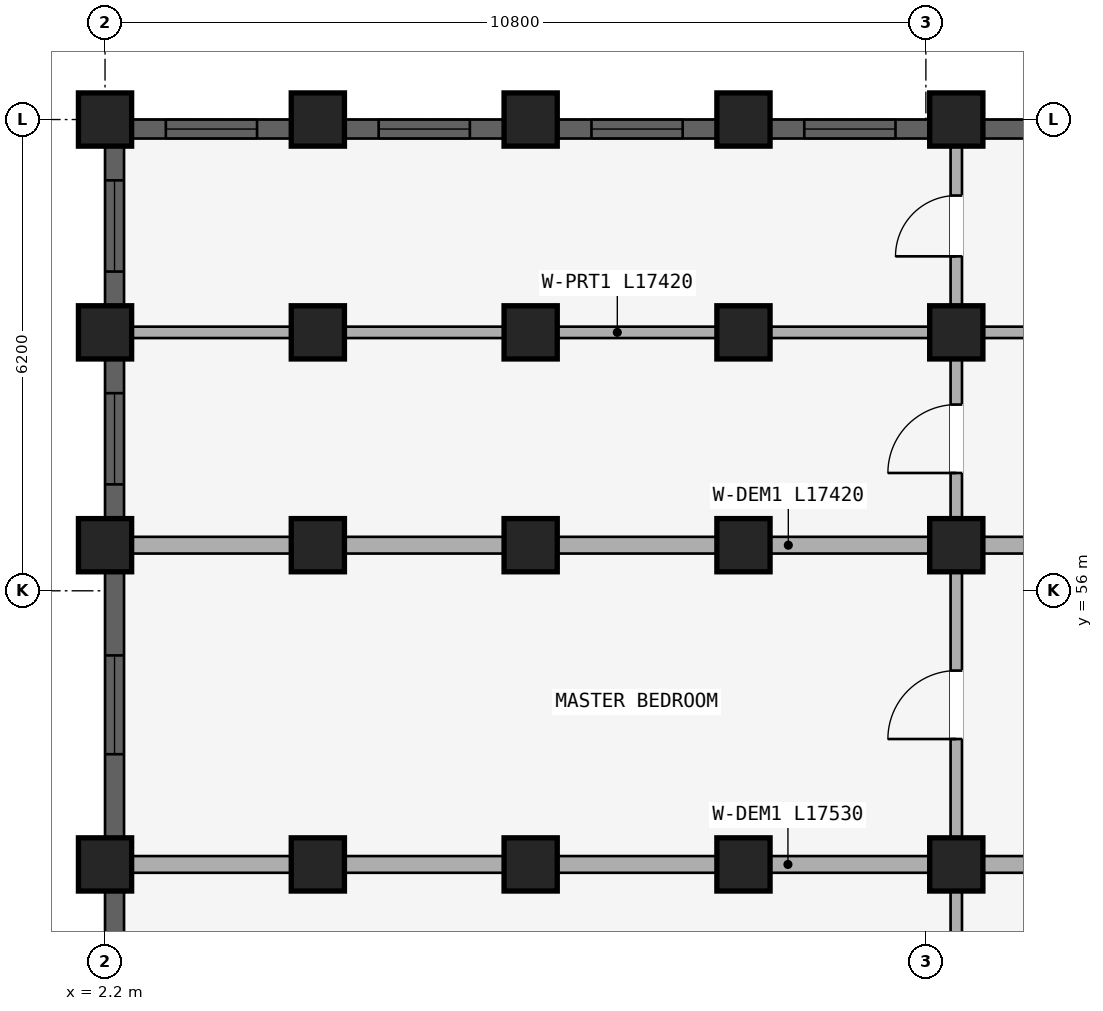
"""IFC4 building model, lengths in metres.
Left out: names, types, materials, properties, quantities, classifications, styles, units other than length and angle.
Written with IfcOpenShell. Run it as: python <this file> out.ifc"""

import sys

from ifc_helpers import new_model, si_unit, direction, frame, frame_2d, origin, origin_2d, place, context, subcontext, project, spatial, rectangle, extrude, element, fill, save


model = new_model("IFC4")
c1 = context("Model", 3, precision=1e-05, world=origin(), true_north=direction((0.0, 1.0)))
c2 = subcontext(c1, "Body", "Model", "MODEL_VIEW")
j1 = project(units=[si_unit("LENGTHUNIT", "METRE"), si_unit("PLANEANGLEUNIT", "RADIAN")], contexts=[c1])
p1 = place(None, origin())
s1 = spatial("IfcSite", under=j1, at=p1, CompositionType="ELEMENT")
p2 = place(p1, origin())
s2 = spatial("IfcBuilding", under=s1, at=p2, CompositionType="ELEMENT")
p3 = place(p2, frame((0.0, 0.0, 18.15)))
s3 = spatial("IfcBuildingStorey", under=s2, at=p3, CompositionType="ELEMENT", Elevation=18.15)
for number, where, z_axis, x_axis in (
    (1, (13.4, 52.4, 0.0), (0.0, 0.0, 1.0), (1.0, 0.0, 0.0)),
    (2, (10.6, 52.4, 0.0), (0.0, 0.0, 1.0), (1.0, 0.0, 0.0)),
    (3, (7.8, 52.4, 0.0), (0.0, 0.0, 1.0), (1.0, 0.0, 0.0)),
    (4, (5.0, 52.4, 0.0), (0.0, 0.0, 1.0), (1.0, 0.0, 0.0)),
):
    element("IfcColumn", number, at=place(p3, frame(where, z_axis=z_axis, x_axis=x_axis)), inside=s3, PredefinedType="COLUMN", context=c2, shape_type="SweptSolid", body=[
        extrude(rectangle(XDim=0.7, YDim=0.7, at=origin_2d()), origin(), (0.0, 0.0, 1.0), 2.93),
    ])
p4 = place(p3, frame((2.2, 52.4, 0.0), z_axis=(0.0, 0.0, 1.0), x_axis=(1.0, 0.0, 0.0)))
e5 = element("IfcColumn", 5, at=p4, inside=s3, PredefinedType="COLUMN", context=c2, shape_type="SweptSolid", body=[
    extrude(rectangle(XDim=0.7, YDim=0.7, at=origin_2d()), origin(), (0.0, 0.0, 1.0), 2.97),
])
for number, where, z_axis, x_axis in (
    (6, (13.4, 56.6, 0.0), (0.0, 0.0, 1.0), (1.0, 0.0, 0.0)),
    (7, (10.6, 56.6, 0.0), (0.0, 0.0, 1.0), (1.0, 0.0, 0.0)),
    (8, (7.8, 56.6, 0.0), (0.0, 0.0, 1.0), (1.0, 0.0, 0.0)),
    (9, (5.0, 56.6, 0.0), (0.0, 0.0, 1.0), (1.0, 0.0, 0.0)),
):
    element("IfcColumn", number, at=place(p3, frame(where, z_axis=z_axis, x_axis=x_axis)), inside=s3, PredefinedType="COLUMN", context=c2, shape_type="SweptSolid", body=[
        extrude(rectangle(XDim=0.7, YDim=0.7, at=origin_2d()), origin(), (0.0, 0.0, 1.0), 2.93),
    ])
p5 = place(p3, frame((2.2, 56.6, 0.0), z_axis=(0.0, 0.0, 1.0), x_axis=(1.0, 0.0, 0.0)))
e10 = element("IfcColumn", 10, at=p5, inside=s3, PredefinedType="COLUMN", context=c2, shape_type="SweptSolid", body=[
    extrude(rectangle(XDim=0.7, YDim=0.7, at=origin_2d()), origin(), (0.0, 0.0, 1.0), 2.97),
])
for number, where, z_axis, x_axis in (
    (11, (13.4, 59.4, 0.0), (0.0, 0.0, 1.0), (1.0, 0.0, 0.0)),
    (12, (10.6, 59.4, 0.0), (0.0, 0.0, 1.0), (1.0, 0.0, 0.0)),
    (13, (7.8, 59.4, 0.0), (0.0, 0.0, 1.0), (1.0, 0.0, 0.0)),
    (14, (5.0, 59.4, 0.0), (0.0, 0.0, 1.0), (1.0, 0.0, 0.0)),
):
    element("IfcColumn", number, at=place(p3, frame(where, z_axis=z_axis, x_axis=x_axis)), inside=s3, PredefinedType="COLUMN", context=c2, shape_type="SweptSolid", body=[
        extrude(rectangle(XDim=0.7, YDim=0.7, at=origin_2d()), origin(), (0.0, 0.0, 1.0), 2.93),
    ])
p6 = place(p3, frame((2.2, 59.4, 0.0), z_axis=(0.0, 0.0, 1.0), x_axis=(1.0, 0.0, 0.0)))
e15 = element("IfcColumn", 15, at=p6, inside=s3, PredefinedType="COLUMN", context=c2, shape_type="SweptSolid", body=[
    extrude(rectangle(XDim=0.7, YDim=0.7, at=origin_2d()), origin(), (0.0, 0.0, 1.0), 2.97),
])
for number, where, z_axis, x_axis in (
    (16, (13.4, 62.2, 0.0), (0.0, 0.0, 1.0), (1.0, 0.0, 0.0)),
    (17, (10.6, 62.2, 0.0), (0.0, 0.0, 1.0), (1.0, 0.0, 0.0)),
    (18, (7.8, 62.2, 0.0), (0.0, 0.0, 1.0), (1.0, 0.0, 0.0)),
    (19, (5.0, 62.2, 0.0), (0.0, 0.0, 1.0), (1.0, 0.0, 0.0)),
):
    element("IfcColumn", number, at=place(p3, frame(where, z_axis=z_axis, x_axis=x_axis)), inside=s3, PredefinedType="COLUMN", context=c2, shape_type="SweptSolid", body=[
        extrude(rectangle(XDim=0.7, YDim=0.7, at=origin_2d()), origin(), (0.0, 0.0, 1.0), 2.93),
    ])
p7 = place(p3, frame((2.2, 62.2, 0.0), z_axis=(0.0, 0.0, 1.0), x_axis=(1.0, 0.0, 0.0)))
e20 = element("IfcColumn", 20, at=p7, inside=s3, PredefinedType="COLUMN", context=c2, shape_type="SweptSolid", body=[
    extrude(rectangle(XDim=0.7, YDim=0.7, at=origin_2d()), origin(), (0.0, 0.0, 1.0), 2.97),
])
p8 = place(p3, frame((13.4, 48.43, 0.0), z_axis=(0.0, 0.0, 1.0), x_axis=(0.0, 1.0, 0.0)))
e21 = element("IfcWall", 21, at=p8, inside=s3, PredefinedType="PARTITIONING", context=c2, shape_type="SweptSolid", body=[
    extrude(rectangle(XDim=3.89, YDim=0.15, at=frame_2d((1.945, 0.0))), origin(), (0.0, 0.0, 1.0), 2.372),
])
p9 = place(p8, frame((1.495, 0.0, 0.0)))
e22 = element("IfcOpeningElement", 22, at=p9, cuts=e21, PredefinedType="OPENING", context=c2, shape_type="SweptSolid", body=[
    extrude(rectangle(XDim=0.9, YDim=2.1, at=frame_2d((0.45, 1.05))), frame((0.0, 0.085, 0.0), z_axis=(0.0, -1.0, 0.0), x_axis=(1.0, 0.0, 0.0)), (0.0, 0.0, 1.0), 0.17),
])
p10 = place(p3, frame((13.4, 52.48, 0.0), z_axis=(0.0, 0.0, 1.0), x_axis=(0.0, 1.0, 0.0)))
e23 = element("IfcWall", 23, at=p10, inside=s3, PredefinedType="PARTITIONING", context=c2, shape_type="SweptSolid", body=[
    extrude(rectangle(XDim=4.04, YDim=0.15, at=frame_2d((2.02, 0.0))), origin(), (0.0, 0.0, 1.0), 2.372),
])
p11 = place(p10, frame((1.57, 0.0, 0.0)))
e24 = element("IfcOpeningElement", 24, at=p11, cuts=e23, PredefinedType="OPENING", context=c2, shape_type="SweptSolid", body=[
    extrude(rectangle(XDim=0.9, YDim=2.1, at=frame_2d((0.45, 1.05))), frame((0.0, 0.085, 0.0), z_axis=(0.0, -1.0, 0.0), x_axis=(1.0, 0.0, 0.0)), (0.0, 0.0, 1.0), 0.17),
])
p12 = place(p3, frame((19.95, 52.4, 0.0), z_axis=(0.0, 0.0, 1.0), x_axis=(-1.0, 0.0, 0.0)))
e25 = element("IfcWall", 25, at=p12, inside=s3, PredefinedType="STANDARD", context=c2, shape_type="SweptSolid", body=[
    extrude(rectangle(XDim=17.53, YDim=0.22, at=frame_2d((8.765, 0.0))), origin(), (0.0, 0.0, 1.0), 2.372),
])
p13 = place(p3, frame((13.4, 56.68, 0.0), z_axis=(0.0, 0.0, 1.0), x_axis=(0.0, 1.0, 0.0)))
e26 = element("IfcWall", 26, at=p13, inside=s3, PredefinedType="PLUMBINGWALL", context=c2, shape_type="SweptSolid", body=[
    extrude(rectangle(XDim=2.64, YDim=0.15, at=frame_2d((1.32, 0.0))), origin(), (0.0, 0.0, 1.0), 2.372),
])
p14 = place(p13, frame((0.87, 0.0, 0.0)))
e27 = element("IfcOpeningElement", 27, at=p14, cuts=e26, PredefinedType="OPENING", context=c2, shape_type="SweptSolid", body=[
    extrude(rectangle(XDim=0.9, YDim=2.1, at=frame_2d((0.45, 1.05))), frame((0.0, 0.085, 0.0), z_axis=(0.0, -1.0, 0.0), x_axis=(1.0, 0.0, 0.0)), (0.0, 0.0, 1.0), 0.17),
])
p15 = place(p3, frame((19.9, 56.6, 0.0), z_axis=(0.0, 0.0, 1.0), x_axis=(-1.0, 0.0, 0.0)))
e28 = element("IfcWall", 28, at=p15, inside=s3, PredefinedType="STANDARD", context=c2, shape_type="SweptSolid", body=[
    extrude(rectangle(XDim=17.42, YDim=0.22, at=frame_2d((8.71, 0.0))), origin(), (0.0, 0.0, 1.0), 2.372),
])
p16 = place(p3, frame((13.4, 59.48, 0.0), z_axis=(0.0, 0.0, 1.0), x_axis=(0.0, 1.0, 0.0)))
e29 = element("IfcWall", 29, at=p16, inside=s3, PredefinedType="PLUMBINGWALL", context=c2, shape_type="SweptSolid", body=[
    extrude(rectangle(XDim=2.64, YDim=0.15, at=frame_2d((1.32, 0.0))), origin(), (0.0, 0.0, 1.0), 2.372),
])
p17 = place(p16, frame((0.92, 0.0, 0.0)))
e30 = element("IfcOpeningElement", 30, at=p17, cuts=e29, PredefinedType="OPENING", context=c2, shape_type="SweptSolid", body=[
    extrude(rectangle(XDim=0.8, YDim=2.1, at=frame_2d((0.4, 1.05))), frame((0.0, 0.085, 0.0), z_axis=(0.0, -1.0, 0.0), x_axis=(1.0, 0.0, 0.0)), (0.0, 0.0, 1.0), 0.17),
])
p18 = place(p3, frame((19.9, 59.4, 0.0), z_axis=(0.0, 0.0, 1.0), x_axis=(-1.0, 0.0, 0.0)))
e31 = element("IfcWall", 31, at=p18, inside=s3, PredefinedType="PARTITIONING", context=c2, shape_type="SweptSolid", body=[
    extrude(rectangle(XDim=17.42, YDim=0.15, at=frame_2d((8.71, 0.0))), origin(), (0.0, 0.0, 1.0), 2.372),
])
p19 = place(p18, frame((2.75, 0.0, 0.0)))
e32 = element("IfcOpeningElement", 32, at=p19, cuts=e31, PredefinedType="OPENING", context=c2, shape_type="SweptSolid", body=[
    extrude(rectangle(XDim=0.9, YDim=2.1, at=frame_2d((0.45, 1.05))), frame((0.0, 0.085, 0.0), z_axis=(0.0, -1.0, 0.0), x_axis=(1.0, 0.0, 0.0)), (0.0, 0.0, 1.0), 0.17),
])
p20 = place(p3, frame((2.325, 48.553, 0.0), z_axis=(0.0, 0.0, 1.0), x_axis=(0.0, 1.0, 0.0)))
e33 = element("IfcWall", 33, at=p20, inside=s3, PredefinedType="STANDARD", context=c2, shape_type="SweptSolid", body=[
    extrude(rectangle(XDim=3.493, YDim=0.25, at=frame_2d((1.747, 0.0))), origin(), (0.0, 0.0, 1.0), 2.48),
])
p21 = place(p20, frame((1.096, 0.0, 0.88)))
e34 = element("IfcOpeningElement", 34, at=p21, cuts=e33, PredefinedType="OPENING", context=c2, shape_type="SweptSolid", body=[
    extrude(rectangle(XDim=1.3, YDim=1.4, at=frame_2d((0.65, 0.7))), frame((0.0, 0.135, 0.0), z_axis=(0.0, -1.0, 0.0), x_axis=(1.0, 0.0, 0.0)), (0.0, 0.0, 1.0), 0.27),
])
p22 = place(p3, frame((2.325, 52.753, 0.0), z_axis=(0.0, 0.0, 1.0), x_axis=(0.0, 1.0, 0.0)))
e35 = element("IfcWall", 35, at=p22, inside=s3, PredefinedType="STANDARD", context=c2, shape_type="SweptSolid", body=[
    extrude(rectangle(XDim=3.493, YDim=0.25, at=frame_2d((1.747, 0.0))), origin(), (0.0, 0.0, 1.0), 2.48),
])
p23 = place(p22, frame((1.096, 0.0, 0.88)))
e36 = element("IfcOpeningElement", 36, at=p23, cuts=e35, PredefinedType="OPENING", context=c2, shape_type="SweptSolid", body=[
    extrude(rectangle(XDim=1.3, YDim=1.4, at=frame_2d((0.65, 0.7))), frame((0.0, 0.135, 0.0), z_axis=(0.0, -1.0, 0.0), x_axis=(1.0, 0.0, 0.0)), (0.0, 0.0, 1.0), 0.27),
])
p24 = place(p3, frame((2.325, 56.954, 0.0), z_axis=(0.0, 0.0, 1.0), x_axis=(0.0, 1.0, 0.0)))
e37 = element("IfcWall", 37, at=p24, inside=s3, PredefinedType="STANDARD", context=c2, shape_type="SweptSolid", body=[
    extrude(rectangle(XDim=2.093, YDim=0.25, at=frame_2d((1.046, 0.0))), origin(), (0.0, 0.0, 1.0), 2.48),
])
p25 = place(p24, frame((0.447, 0.0, 0.78)))
e38 = element("IfcOpeningElement", 38, at=p25, cuts=e37, PredefinedType="OPENING", context=c2, shape_type="SweptSolid", body=[
    extrude(rectangle(XDim=1.2, YDim=1.5, at=frame_2d((0.6, 0.75))), frame((0.0, 0.135, 0.0), z_axis=(0.0, -1.0, 0.0), x_axis=(1.0, 0.0, 0.0)), (0.0, 0.0, 1.0), 0.27),
])
p26 = place(p3, frame((2.325, 59.753, 0.0), z_axis=(0.0, 0.0, 1.0), x_axis=(0.0, 1.0, 0.0)))
e39 = element("IfcWall", 39, at=p26, inside=s3, PredefinedType="STANDARD", context=c2, shape_type="SweptSolid", body=[
    extrude(rectangle(XDim=2.093, YDim=0.25, at=frame_2d((1.046, 0.0))), origin(), (0.0, 0.0, 1.0), 2.48),
])
p27 = place(p26, frame((0.447, 0.0, 0.78)))
e40 = element("IfcOpeningElement", 40, at=p27, cuts=e39, PredefinedType="OPENING", context=c2, shape_type="SweptSolid", body=[
    extrude(rectangle(XDim=1.2, YDim=1.5, at=frame_2d((0.6, 0.75))), frame((0.0, 0.135, 0.0), z_axis=(0.0, -1.0, 0.0), x_axis=(1.0, 0.0, 0.0)), (0.0, 0.0, 1.0), 0.27),
])
p28 = place(p3, frame((19.771, 62.075, 0.0), z_axis=(0.0, 0.0, 1.0), x_axis=(-1.0, 0.0, 0.0)))
e41 = element("IfcWall", 41, at=p28, inside=s3, PredefinedType="STANDARD", context=c2, shape_type="SweptSolid", body=[
    extrude(rectangle(XDim=6.018, YDim=0.25, at=frame_2d((3.009, 0.0))), origin(), (0.0, 0.0, 1.0), 2.372),
])
p29 = place(p28, frame((2.322, 0.0, 0.522)))
e42 = element("IfcOpeningElement", 42, at=p29, cuts=e41, PredefinedType="OPENING", context=c2, shape_type="SweptSolid", body=[
    extrude(rectangle(XDim=1.5, YDim=1.65, at=frame_2d((0.75, 0.825))), frame((0.0, 0.135, 0.0), z_axis=(0.0, -1.0, 0.0), x_axis=(1.0, 0.0, 0.0)), (0.0, 0.0, 1.0), 0.27),
])
p30 = place(p3, frame((13.046, 62.075, 0.0), z_axis=(0.0, 0.0, 1.0), x_axis=(-1.0, 0.0, 0.0)))
e43 = element("IfcWall", 43, at=p30, inside=s3, PredefinedType="STANDARD", context=c2, shape_type="SweptSolid", body=[
    extrude(rectangle(XDim=2.093, YDim=0.25, at=frame_2d((1.046, 0.0))), origin(), (0.0, 0.0, 1.0), 2.372),
])
p31 = place(p30, frame((0.447, 0.0, 0.672)))
e44 = element("IfcOpeningElement", 44, at=p31, cuts=e43, PredefinedType="OPENING", context=c2, shape_type="SweptSolid", body=[
    extrude(rectangle(XDim=1.2, YDim=1.5, at=frame_2d((0.6, 0.75))), frame((0.0, 0.135, 0.0), z_axis=(0.0, -1.0, 0.0), x_axis=(1.0, 0.0, 0.0)), (0.0, 0.0, 1.0), 0.27),
])
p32 = place(p3, frame((10.247, 62.075, 0.0), z_axis=(0.0, 0.0, 1.0), x_axis=(-1.0, 0.0, 0.0)))
e45 = element("IfcWall", 45, at=p32, inside=s3, PredefinedType="STANDARD", context=c2, shape_type="SweptSolid", body=[
    extrude(rectangle(XDim=2.093, YDim=0.25, at=frame_2d((1.046, 0.0))), origin(), (0.0, 0.0, 1.0), 2.372),
])
p33 = place(p32, frame((0.447, 0.0, 0.672)))
e46 = element("IfcOpeningElement", 46, at=p33, cuts=e45, PredefinedType="OPENING", context=c2, shape_type="SweptSolid", body=[
    extrude(rectangle(XDim=1.2, YDim=1.5, at=frame_2d((0.6, 0.75))), frame((0.0, 0.135, 0.0), z_axis=(0.0, -1.0, 0.0), x_axis=(1.0, 0.0, 0.0)), (0.0, 0.0, 1.0), 0.27),
])
p34 = place(p3, frame((7.447, 62.075, 0.0), z_axis=(0.0, 0.0, 1.0), x_axis=(-1.0, 0.0, 0.0)))
e47 = element("IfcWall", 47, at=p34, inside=s3, PredefinedType="STANDARD", context=c2, shape_type="SweptSolid", body=[
    extrude(rectangle(XDim=2.093, YDim=0.25, at=frame_2d((1.046, 0.0))), origin(), (0.0, 0.0, 1.0), 2.372),
])
p35 = place(p34, frame((0.447, 0.0, 0.672)))
e48 = element("IfcOpeningElement", 48, at=p35, cuts=e47, PredefinedType="OPENING", context=c2, shape_type="SweptSolid", body=[
    extrude(rectangle(XDim=1.2, YDim=1.5, at=frame_2d((0.6, 0.75))), frame((0.0, 0.135, 0.0), z_axis=(0.0, -1.0, 0.0), x_axis=(1.0, 0.0, 0.0)), (0.0, 0.0, 1.0), 0.27),
])
p36 = place(p3, frame((4.646, 62.075, 0.0), z_axis=(0.0, 0.0, 1.0), x_axis=(-1.0, 0.0, 0.0)))
e49 = element("IfcWall", 49, at=p36, inside=s3, PredefinedType="STANDARD", context=c2, shape_type="SweptSolid", body=[
    extrude(rectangle(XDim=2.093, YDim=0.25, at=frame_2d((1.046, 0.0))), origin(), (0.0, 0.0, 1.0), 2.412),
])
p37 = place(p36, frame((0.447, 0.0, 0.712)))
e50 = element("IfcOpeningElement", 50, at=p37, cuts=e49, PredefinedType="OPENING", context=c2, shape_type="SweptSolid", body=[
    extrude(rectangle(XDim=1.2, YDim=1.5, at=frame_2d((0.6, 0.75))), frame((0.0, 0.135, 0.0), z_axis=(0.0, -1.0, 0.0), x_axis=(1.0, 0.0, 0.0)), (0.0, 0.0, 1.0), 0.27),
])
p38 = place(p23, origin())
e51 = element("IfcWindow", 51, at=p38, inside=s3, PartitioningType="DOUBLE_PANEL_HORIZONTAL", PredefinedType="WINDOW", context=c2, shape_type="SweptSolid", body=[
    extrude(rectangle(XDim=1.3, YDim=1.4, at=frame_2d((0.65, 0.7))), frame((0.0, 0.03, 0.0), z_axis=(0.0, -1.0, 0.0), x_axis=(1.0, 0.0, 0.0)), (0.0, 0.0, 1.0), 0.06),
])
fill(e36, e51)
p39 = place(p25, origin())
e52 = element("IfcWindow", 52, at=p39, inside=s3, PartitioningType="SINGLE_PANEL", PredefinedType="WINDOW", context=c2, shape_type="SweptSolid", body=[
    extrude(rectangle(XDim=1.2, YDim=1.5, at=frame_2d((0.6, 0.75))), frame((0.0, 0.03, 0.0), z_axis=(0.0, -1.0, 0.0), x_axis=(1.0, 0.0, 0.0)), (0.0, 0.0, 1.0), 0.06),
])
fill(e38, e52)
p40 = place(p27, origin())
e53 = element("IfcWindow", 53, at=p40, inside=s3, PartitioningType="SINGLE_PANEL", PredefinedType="WINDOW", context=c2, shape_type="SweptSolid", body=[
    extrude(rectangle(XDim=1.2, YDim=1.5, at=frame_2d((0.6, 0.75))), frame((0.0, 0.03, 0.0), z_axis=(0.0, -1.0, 0.0), x_axis=(1.0, 0.0, 0.0)), (0.0, 0.0, 1.0), 0.06),
])
fill(e40, e53)
p41 = place(p31, origin())
e54 = element("IfcWindow", 54, at=p41, inside=s3, PartitioningType="SINGLE_PANEL", PredefinedType="WINDOW", context=c2, shape_type="SweptSolid", body=[
    extrude(rectangle(XDim=1.2, YDim=1.5, at=frame_2d((0.6, 0.75))), frame((0.0, 0.03, 0.0), z_axis=(0.0, -1.0, 0.0), x_axis=(1.0, 0.0, 0.0)), (0.0, 0.0, 1.0), 0.06),
])
fill(e44, e54)
p42 = place(p33, origin())
e55 = element("IfcWindow", 55, at=p42, inside=s3, PartitioningType="SINGLE_PANEL", PredefinedType="WINDOW", context=c2, shape_type="SweptSolid", body=[
    extrude(rectangle(XDim=1.2, YDim=1.5, at=frame_2d((0.6, 0.75))), frame((0.0, 0.03, 0.0), z_axis=(0.0, -1.0, 0.0), x_axis=(1.0, 0.0, 0.0)), (0.0, 0.0, 1.0), 0.06),
])
fill(e46, e55)
p43 = place(p35, origin())
e56 = element("IfcWindow", 56, at=p43, inside=s3, PartitioningType="SINGLE_PANEL", PredefinedType="WINDOW", context=c2, shape_type="SweptSolid", body=[
    extrude(rectangle(XDim=1.2, YDim=1.5, at=frame_2d((0.6, 0.75))), frame((0.0, 0.03, 0.0), z_axis=(0.0, -1.0, 0.0), x_axis=(1.0, 0.0, 0.0)), (0.0, 0.0, 1.0), 0.06),
])
fill(e48, e56)
p44 = place(p37, origin())
e57 = element("IfcWindow", 57, at=p44, inside=s3, PartitioningType="SINGLE_PANEL", PredefinedType="WINDOW", context=c2, shape_type="SweptSolid", body=[
    extrude(rectangle(XDim=1.2, YDim=1.5, at=frame_2d((0.6, 0.75))), frame((0.0, 0.03, 0.0), z_axis=(0.0, -1.0, 0.0), x_axis=(1.0, 0.0, 0.0)), (0.0, 0.0, 1.0), 0.06),
])
fill(e50, e57)
p45 = place(p11, origin())
e58 = element("IfcDoor", 58, at=p45, inside=s3, OperationType="SINGLE_SWING_LEFT", PredefinedType="DOOR", context=c2, shape_type="SweptSolid", body=[
    extrude(rectangle(XDim=0.9, YDim=2.1, at=frame_2d((0.45, 1.05))), frame((0.0, 0.025, 0.0), z_axis=(0.0, -1.0, 0.0), x_axis=(1.0, 0.0, 0.0)), (0.0, 0.0, 1.0), 0.05),
])
fill(e24, e58)
p46 = place(p14, origin())
e59 = element("IfcDoor", 59, at=p46, inside=s3, OperationType="SINGLE_SWING_LEFT", PredefinedType="DOOR", context=c2, shape_type="SweptSolid", body=[
    extrude(rectangle(XDim=0.9, YDim=2.1, at=frame_2d((0.45, 1.05))), frame((0.0, 0.025, 0.0), z_axis=(0.0, -1.0, 0.0), x_axis=(1.0, 0.0, 0.0)), (0.0, 0.0, 1.0), 0.05),
])
fill(e27, e59)
p47 = place(p17, origin())
e60 = element("IfcDoor", 60, at=p47, inside=s3, OperationType="SINGLE_SWING_LEFT", PredefinedType="DOOR", context=c2, shape_type="SweptSolid", body=[
    extrude(rectangle(XDim=0.8, YDim=2.1, at=frame_2d((0.4, 1.05))), frame((0.0, 0.025, 0.0), z_axis=(0.0, -1.0, 0.0), x_axis=(1.0, 0.0, 0.0)), (0.0, 0.0, 1.0), 0.05),
])
fill(e30, e60)
save(model, sys.argv[1])
